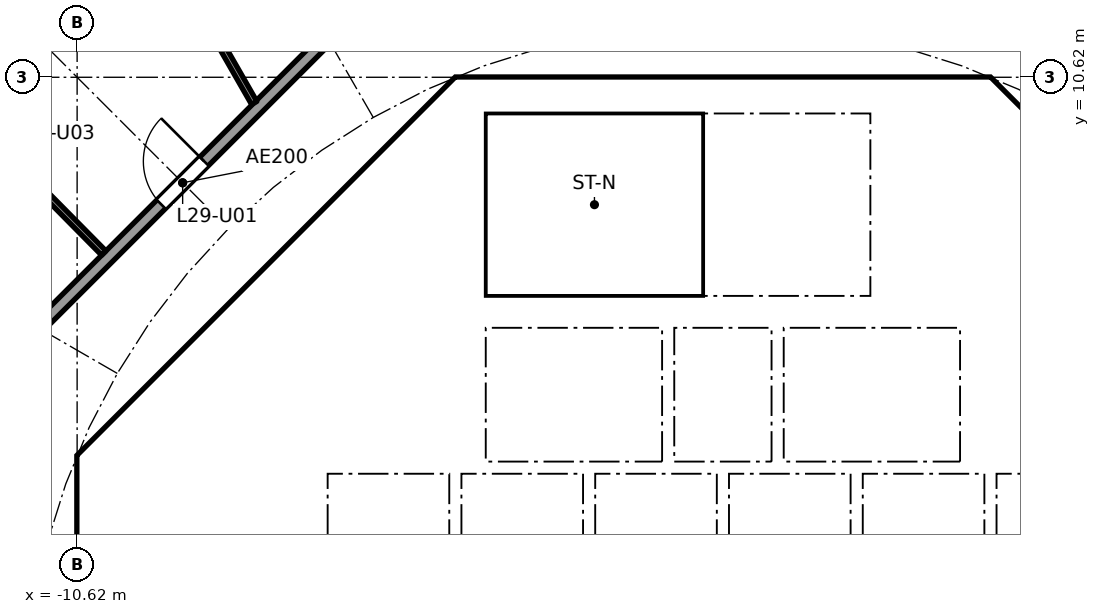
"""IFC4 building model, lengths in metres.
Left out: names, types, materials, properties, quantities, classifications, styles, units other than length and angle.
Written with IfcOpenShell. Run it as: python <this file> out.ifc"""

import sys

from ifc_helpers import new_model, si_unit, direction, frame, frame_2d, origin, place, context, subcontext, project, spatial, polyline, rectangle, outline, extrude, element, fill, save


model = new_model("IFC4")
c1 = context("Model", 3, precision=1e-05, world=origin(), true_north=direction((0.0, 1.0)))
c2 = subcontext(c1, "Body", "Model", "MODEL_VIEW")
j1 = project(units=[si_unit("LENGTHUNIT", "METRE"), si_unit("PLANEANGLEUNIT", "RADIAN")], contexts=[c1])
p1 = place(None, origin())
s1 = spatial("IfcSite", under=j1, at=p1, CompositionType="ELEMENT")
p2 = place(p1, origin())
s2 = spatial("IfcBuilding", under=s1, at=p2, CompositionType="ELEMENT")
p3 = place(p2, frame((0.0, 0.0, 119.6)))
s3 = spatial("IfcBuildingStorey", under=s2, at=p3, CompositionType="ELEMENT", Elevation=119.6)
p4 = place(p3, frame((9.988, 4.613, 0.0), z_axis=(0.0, 0.0, 1.0), x_axis=(-0.707106781187, 0.707106781187, 0.0)))
e1 = element("IfcWall", 1, at=p4, inside=s3, PredefinedType="SHEAR", context=c2, shape_type="SweptSolid", body=[
    extrude(rectangle(XDim=7.602, YDim=0.6, at=frame_2d((3.801, 0.0))), origin(), (0.0, 0.0, 1.0), 3.44),
])
p5 = place(p4, frame((3.201, 0.0, 0.0)))
e2 = element("IfcOpeningElement", 2, at=p5, cuts=e1, PredefinedType="OPENING", context=c2, shape_type="SweptSolid", body=[
    extrude(rectangle(XDim=1.2, YDim=2.1, at=frame_2d((0.6, 1.05))), frame((0.0, 0.31, 0.0), z_axis=(0.0, -1.0, 0.0), x_axis=(1.0, 0.0, 0.0)), (0.0, 0.0, 1.0), 0.62),
])
p6 = place(p3, frame((-4.613, 9.988, 0.0), z_axis=(0.0, 0.0, 1.0), x_axis=(-0.707106781187, -0.707106781187, 0.0)))
e3 = element("IfcWall", 3, at=p6, inside=s3, PredefinedType="SHEAR", context=c2, shape_type="SweptSolid", body=[
    extrude(rectangle(XDim=7.602, YDim=0.6, at=frame_2d((3.801, 0.0))), origin(), (0.0, 0.0, 1.0), 3.44),
])
p7 = place(p6, frame((0.351, 0.0, 0.0)))
e4 = element("IfcOpeningElement", 4, at=p7, cuts=e3, PredefinedType="OPENING", context=c2, shape_type="SweptSolid", body=[
    extrude(rectangle(XDim=1.1, YDim=2.1, at=frame_2d((0.55, 1.05))), frame((0.0, 0.31, 0.0), z_axis=(0.0, -1.0, 0.0), x_axis=(1.0, 0.0, 0.0)), (0.0, 0.0, 1.0), 0.62),
])
p8 = place(p3, frame((-10.325, 3.801, 0.0), z_axis=(0.0, 0.0, 1.0), x_axis=(0.0, -1.0, 0.0)))
e5 = element("IfcWall", 5, at=p8, inside=s3, PredefinedType="SHEAR", context=c2, shape_type="SweptSolid", body=[
    extrude(rectangle(XDim=7.602, YDim=0.6, at=frame_2d((3.801, 0.0))), origin(), (0.0, 0.0, 1.0), 3.44),
])
p9 = place(p8, frame((0.651, 0.0, 0.0)))
e6 = element("IfcOpeningElement", 6, at=p9, cuts=e5, PredefinedType="OPENING", context=c2, shape_type="SweptSolid", body=[
    extrude(rectangle(XDim=1.5, YDim=2.1, at=frame_2d((0.75, 1.05))), frame((0.0, 0.31, 0.0), z_axis=(0.0, -1.0, 0.0), x_axis=(1.0, 0.0, 0.0)), (0.0, 0.0, 1.0), 0.62),
])
p10 = place(p8, frame((5.451, 0.0, 0.0)))
e7 = element("IfcOpeningElement", 7, at=p10, cuts=e5, PredefinedType="OPENING", context=c2, shape_type="SweptSolid", body=[
    extrude(rectangle(XDim=1.5, YDim=2.1, at=frame_2d((0.75, 1.05))), frame((0.0, 0.31, 0.0), z_axis=(0.0, -1.0, 0.0), x_axis=(1.0, 0.0, 0.0)), (0.0, 0.0, 1.0), 0.62),
])
p11 = place(p3, frame((-5.8, 4.3, 0.0), z_axis=(0.0, 0.0, 1.0), x_axis=(0.0, 1.0, 0.0)))
e8 = element("IfcWall", 8, at=p11, inside=s3, PredefinedType="PARTITIONING", context=c2, shape_type="SweptSolid", body=[
    extrude(rectangle(XDim=3.927, YDim=0.15, at=frame_2d((1.963, 0.0))), origin(), (0.0, 0.0, 1.0), 3.44),
])
p12 = place(p11, frame((1.551, 0.0, 0.0)))
e9 = element("IfcOpeningElement", 9, at=p12, cuts=e8, PredefinedType="OPENING", context=c2, shape_type="SweptSolid", body=[
    extrude(rectangle(XDim=0.9, YDim=2.1, at=frame_2d((0.45, 1.05))), frame((0.0, 0.085, 0.0), z_axis=(0.0, -1.0, 0.0), x_axis=(1.0, 0.0, 0.0)), (0.0, 0.0, 1.0), 0.17),
])
p13 = place(p3, frame((4.0, 4.3, 0.0), z_axis=(0.0, 0.0, 1.0), x_axis=(0.0, 1.0, 0.0)))
e10 = element("IfcWall", 10, at=p13, inside=s3, PredefinedType="SOLIDWALL", context=c2, shape_type="SweptSolid", body=[
    extrude(rectangle(XDim=2.2, YDim=0.2, at=frame_2d((1.1, 0.0))), origin(), (0.0, 0.0, 1.0), 3.44),
])
p14 = place(p13, frame((0.55, 0.0, 0.0)))
e11 = element("IfcOpeningElement", 11, at=p14, cuts=e10, PredefinedType="OPENING", context=c2, shape_type="SweptSolid", body=[
    extrude(rectangle(XDim=1.1, YDim=2.1, at=frame_2d((0.55, 1.05))), frame((0.0, 0.11, 0.0), z_axis=(0.0, -1.0, 0.0), x_axis=(1.0, 0.0, 0.0)), (0.0, 0.0, 1.0), 0.22),
])
p15 = place(p3, frame((-4.0, 4.3, 0.0), z_axis=(0.0, 0.0, 1.0), x_axis=(0.0, 1.0, 0.0)))
e12 = element("IfcWall", 12, at=p15, inside=s3, PredefinedType="SOLIDWALL", context=c2, shape_type="SweptSolid", body=[
    extrude(rectangle(XDim=2.2, YDim=0.2, at=frame_2d((1.1, 0.0))), origin(), (0.0, 0.0, 1.0), 3.44),
])
p16 = place(p15, frame((0.55, 0.0, 0.0)))
e13 = element("IfcOpeningElement", 13, at=p16, cuts=e12, PredefinedType="OPENING", context=c2, shape_type="SweptSolid", body=[
    extrude(rectangle(XDim=1.1, YDim=2.1, at=frame_2d((0.55, 1.05))), frame((0.0, 0.11, 0.0), z_axis=(0.0, -1.0, 0.0), x_axis=(1.0, 0.0, 0.0)), (0.0, 0.0, 1.0), 0.22),
])
p17 = place(p3, frame((4.0, 7.025, 0.0), z_axis=(0.0, 0.0, 1.0), x_axis=(0.0, 1.0, 0.0)))
e14 = element("IfcWall", 14, at=p17, inside=s3, PredefinedType="SOLIDWALL", context=c2, shape_type="SweptSolid", body=[
    extrude(rectangle(XDim=3.0, YDim=0.2, at=frame_2d((1.5, 0.0))), origin(), (0.0, 0.0, 1.0), 3.44),
])
p18 = place(p17, frame((0.925, 0.0, 0.0)))
e15 = element("IfcOpeningElement", 15, at=p18, cuts=e14, PredefinedType="OPENING", context=c2, shape_type="SweptSolid", body=[
    extrude(rectangle(XDim=1.1, YDim=2.1, at=frame_2d((0.55, 1.05))), frame((0.0, 0.11, 0.0), z_axis=(0.0, -1.0, 0.0), x_axis=(1.0, 0.0, 0.0)), (0.0, 0.0, 1.0), 0.22),
])
p19 = place(p3, origin())
e16 = element("IfcWall", 16, at=p19, inside=s3, PredefinedType="SHEAR", context=c2, shape_type="SweptSolid", body=[
    extrude(outline(polyline([(-10.2, 4.825), (-9.776, 4.401), (-10.025, 4.152), (-10.025, 3.801), (-10.625, 3.801), (-10.625, 4.401), (-10.2, 4.825)])), origin(), (0.0, 0.0, 1.0), 3.44),
])
p20 = place(p3, origin())
e17 = element("IfcWall", 17, at=p20, inside=s3, PredefinedType="SHEAR", context=c2, shape_type="SweptSolid", body=[
    extrude(outline(polyline([(-4.152, 10.025), (-4.401, 9.776), (-4.825, 10.2), (-4.401, 10.625), (4.401, 10.625), (4.825, 10.2), (4.401, 9.776), (4.152, 10.025), (-4.152, 10.025)])), origin(), (0.0, 0.0, 1.0), 3.44),
])
for number, where, z_axis, x_axis in (
    (18, (-0.9, 4.3, 0.0), (0.0, 0.0, 1.0), (0.0, 1.0, 0.0)),
    (19, (0.9, 4.3, 0.0), (0.0, 0.0, 1.0), (0.0, 1.0, 0.0)),
):
    element("IfcWall", number, at=place(p3, frame(where, z_axis=z_axis, x_axis=x_axis)), inside=s3, PredefinedType="SOLIDWALL", context=c2, shape_type="SweptSolid", body=[
        extrude(rectangle(XDim=2.2, YDim=0.2, at=frame_2d((1.1, 0.0))), origin(), (0.0, 0.0, 1.0), 3.44),
    ])
p21 = place(p3, origin())
e20 = element("IfcWall", 20, at=p21, inside=s3, PredefinedType="SOLIDWALL", context=c2, shape_type="SweptSolid", body=[
    extrude(outline(polyline([(-6.5, 2.1), (-6.7, 2.1), (-6.7, 4.3), (6.7, 4.3), (6.7, 2.1), (6.5, 2.1), (6.5, 4.1), (4.5, 4.1), (4.5, 2.1), (4.3, 2.1), (4.3, 4.1), (2.3, 4.1), (2.3, 2.1), (2.1, 2.1), (2.1, 4.1), (0.1, 4.1), (0.1, 2.1), (-0.1, 2.1), (-0.1, 4.1), (-2.1, 4.1), (-2.1, 2.1), (-2.3, 2.1), (-2.3, 4.1), (-4.3, 4.1), (-4.3, 2.1), (-4.5, 2.1), (-4.5, 4.1), (-6.5, 4.1), (-6.5, 2.1)])), origin(), (0.0, 0.0, 1.0), 3.44),
])
p22 = place(p3, frame((-10.025, 4.0, 0.0), z_axis=(0.0, 0.0, 1.0), x_axis=(1.0, 0.0, 0.0)))
e21 = element("IfcWall", 21, at=p22, inside=s3, PredefinedType="PARTITIONING", context=c2, shape_type="SweptSolid", body=[
    extrude(rectangle(XDim=3.325, YDim=0.2, at=frame_2d((1.662, 0.0))), origin(), (0.0, 0.0, 1.0), 3.44),
])
p23 = place(p3, origin())
e22 = element("IfcWall", 22, at=p23, inside=s3, PredefinedType="SOLIDWALL", context=c2, shape_type="SweptSolid", body=[
    extrude(outline(polyline([(-3.9, 7.025), (-4.1, 7.025), (-4.1, 10.025), (-3.9, 10.025), (-3.9, 7.025)])), origin(), (0.0, 0.0, 1.0), 3.44),
])
p24 = place(p3, origin())
e23 = element("IfcWall", 23, at=p24, inside=s3, PredefinedType="SOLIDWALL", context=c2, shape_type="SweptSolid", body=[
    extrude(outline(polyline([(4.1, 6.5), (-4.1, 6.5), (-4.1, 7.025), (4.1, 7.025), (4.1, 6.5)])), origin(), (0.0, 0.0, 1.0), 3.44),
])
p25 = place(p3, frame((-5.275, 12.494, 0.0), z_axis=(0.0, 0.0, 1.0), x_axis=(-0.707106781187, -0.707106781187, 0.0)))
e24 = element("IfcWall", 24, at=p25, inside=s3, PredefinedType="PARTITIONING", context=c2, shape_type="SweptSolid", body=[
    extrude(rectangle(XDim=10.209, YDim=0.2, at=frame_2d((5.104, 0.0))), origin(), (0.0, 0.0, 1.0), 3.44),
])
p26 = place(p25, frame((4.604, 0.0, 0.0)))
e25 = element("IfcOpeningElement", 25, at=p26, cuts=e24, PredefinedType="OPENING", context=c2, shape_type="SweptSolid", body=[
    extrude(rectangle(XDim=1.0, YDim=2.1, at=frame_2d((0.5, 1.05))), frame((0.0, 0.11, 0.0), z_axis=(0.0, -1.0, 0.0), x_axis=(1.0, 0.0, 0.0)), (0.0, 0.0, 1.0), 0.22),
])
p27 = place(p3, frame((-7.708, 10.198, 0.0), z_axis=(0.0, 0.0, 1.0), x_axis=(-0.497449462689, 0.867492957937, 0.0)))
e26 = element("IfcWall", 26, at=p27, inside=s3, PredefinedType="PARTITIONING", context=c2, shape_type="SweptSolid", body=[
    extrude(rectangle(XDim=9.185, YDim=0.1, at=frame_2d((4.592, 0.0))), origin(), (0.0, 0.0, 1.0), 2.756),
])
p28 = place(p27, frame((1.511, 0.0, 0.0)))
e27 = element("IfcOpeningElement", 27, at=p28, cuts=e26, PredefinedType="OPENING", context=c2, shape_type="SweptSolid", body=[
    extrude(rectangle(XDim=0.9, YDim=2.1, at=frame_2d((0.45, 1.05))), frame((0.0, 0.06, 0.0), z_axis=(0.0, -1.0, 0.0), x_axis=(1.0, 0.0, 0.0)), (0.0, 0.0, 1.0), 0.12),
])
p29 = place(p27, frame((6.078, 0.0, 0.0)))
e28 = element("IfcOpeningElement", 28, at=p29, cuts=e26, PredefinedType="OPENING", context=c2, shape_type="SweptSolid", body=[
    extrude(rectangle(XDim=0.9, YDim=2.1, at=frame_2d((0.45, 1.05))), frame((0.0, 0.06, 0.0), z_axis=(0.0, -1.0, 0.0), x_axis=(1.0, 0.0, 0.0)), (0.0, 0.0, 1.0), 0.12),
])
p30 = place(p3, frame((-10.182, 7.729, 0.0), z_axis=(0.0, 0.0, 1.0), x_axis=(-0.702927211734, 0.711261790766, 0.0)))
e29 = element("IfcWall", 29, at=p30, inside=s3, PredefinedType="PARTITIONING", context=c2, shape_type="SweptSolid", body=[
    extrude(rectangle(XDim=9.168, YDim=0.1, at=frame_2d((4.584, 0.0))), origin(), (0.0, 0.0, 1.0), 2.756),
])
p31 = place(p30, frame((1.507, 0.0, 0.0)))
e30 = element("IfcOpeningElement", 30, at=p31, cuts=e29, PredefinedType="OPENING", context=c2, shape_type="SweptSolid", body=[
    extrude(rectangle(XDim=0.9, YDim=2.1, at=frame_2d((0.45, 1.05))), frame((0.0, 0.06, 0.0), z_axis=(0.0, -1.0, 0.0), x_axis=(1.0, 0.0, 0.0)), (0.0, 0.0, 1.0), 0.12),
])
p32 = place(p30, frame((6.067, 0.0, 0.0)))
e31 = element("IfcOpeningElement", 31, at=p32, cuts=e29, PredefinedType="OPENING", context=c2, shape_type="SweptSolid", body=[
    extrude(rectangle(XDim=0.9, YDim=2.1, at=frame_2d((0.45, 1.05))), frame((0.0, 0.06, 0.0), z_axis=(0.0, -1.0, 0.0), x_axis=(1.0, 0.0, 0.0)), (0.0, 0.0, 1.0), 0.12),
])
p33 = place(p14, origin())
e32 = element("IfcDoor", 32, at=p33, inside=s3, OperationType="DOUBLE_DOOR_SLIDING", PredefinedType="DOOR", context=c2, shape_type="SweptSolid", body=[
    extrude(rectangle(XDim=1.1, YDim=2.1, at=frame_2d((0.55, 1.05))), frame((0.0, 0.025, 0.0), z_axis=(0.0, -1.0, 0.0), x_axis=(1.0, 0.0, 0.0)), (0.0, 0.0, 1.0), 0.05),
])
fill(e11, e32)
p34 = place(p16, origin())
e33 = element("IfcDoor", 33, at=p34, inside=s3, OperationType="DOUBLE_DOOR_SLIDING", PredefinedType="DOOR", context=c2, shape_type="SweptSolid", body=[
    extrude(rectangle(XDim=1.1, YDim=2.1, at=frame_2d((0.55, 1.05))), frame((0.0, 0.025, 0.0), z_axis=(0.0, -1.0, 0.0), x_axis=(1.0, 0.0, 0.0)), (0.0, 0.0, 1.0), 0.05),
])
fill(e13, e33)
p35 = place(p18, origin())
e34 = element("IfcDoor", 34, at=p35, inside=s3, OperationType="SINGLE_SWING_RIGHT", PredefinedType="DOOR", context=c2, shape_type="SweptSolid", body=[
    extrude(rectangle(XDim=1.1, YDim=2.1, at=frame_2d((0.55, 1.05))), frame((0.0, 0.025, 0.0), z_axis=(0.0, -1.0, 0.0), x_axis=(1.0, 0.0, 0.0)), (0.0, 0.0, 1.0), 0.05),
])
fill(e15, e34)
p36 = place(p12, origin())
e35 = element("IfcDoor", 35, at=p36, inside=s3, OperationType="SINGLE_SWING_LEFT", PredefinedType="DOOR", context=c2, shape_type="SweptSolid", body=[
    extrude(rectangle(XDim=0.9, YDim=2.1, at=frame_2d((0.45, 1.05))), frame((0.0, 0.025, 0.0), z_axis=(0.0, -1.0, 0.0), x_axis=(1.0, 0.0, 0.0)), (0.0, 0.0, 1.0), 0.05),
])
fill(e9, e35)
p37 = place(p9, origin())
e36 = element("IfcDoor", 36, at=p37, inside=s3, OperationType="DOUBLE_DOOR_SINGLE_SWING", PredefinedType="DOOR", context=c2, shape_type="SweptSolid", body=[
    extrude(rectangle(XDim=1.5, YDim=2.1, at=frame_2d((0.75, 1.05))), frame((0.0, 0.025, 0.0), z_axis=(0.0, -1.0, 0.0), x_axis=(1.0, 0.0, 0.0)), (0.0, 0.0, 1.0), 0.05),
])
fill(e6, e36)
p38 = place(p7, origin())
e37 = element("IfcDoor", 37, at=p38, inside=s3, OperationType="SINGLE_SWING_RIGHT", PredefinedType="DOOR", context=c2, shape_type="SweptSolid", body=[
    extrude(rectangle(XDim=1.1, YDim=2.1, at=frame_2d((0.55, 1.05))), frame((0.0, 0.025, 0.0), z_axis=(0.0, -1.0, 0.0), x_axis=(1.0, 0.0, 0.0)), (0.0, 0.0, 1.0), 0.05),
])
fill(e4, e37)
p39 = place(p26, frame((1.0, 0.0, 0.0), x_axis=(-1.0, 0.0, 0.0)))
e38 = element("IfcDoor", 38, at=p39, inside=s3, OperationType="SINGLE_SWING_RIGHT", PredefinedType="DOOR", context=c2, shape_type="SweptSolid", body=[
    extrude(rectangle(XDim=1.0, YDim=2.1, at=frame_2d((0.5, 1.05))), frame((0.0, 0.025, 0.0), z_axis=(0.0, -1.0, 0.0), x_axis=(1.0, 0.0, 0.0)), (0.0, 0.0, 1.0), 0.05),
])
fill(e25, e38)
save(model, sys.argv[1])
